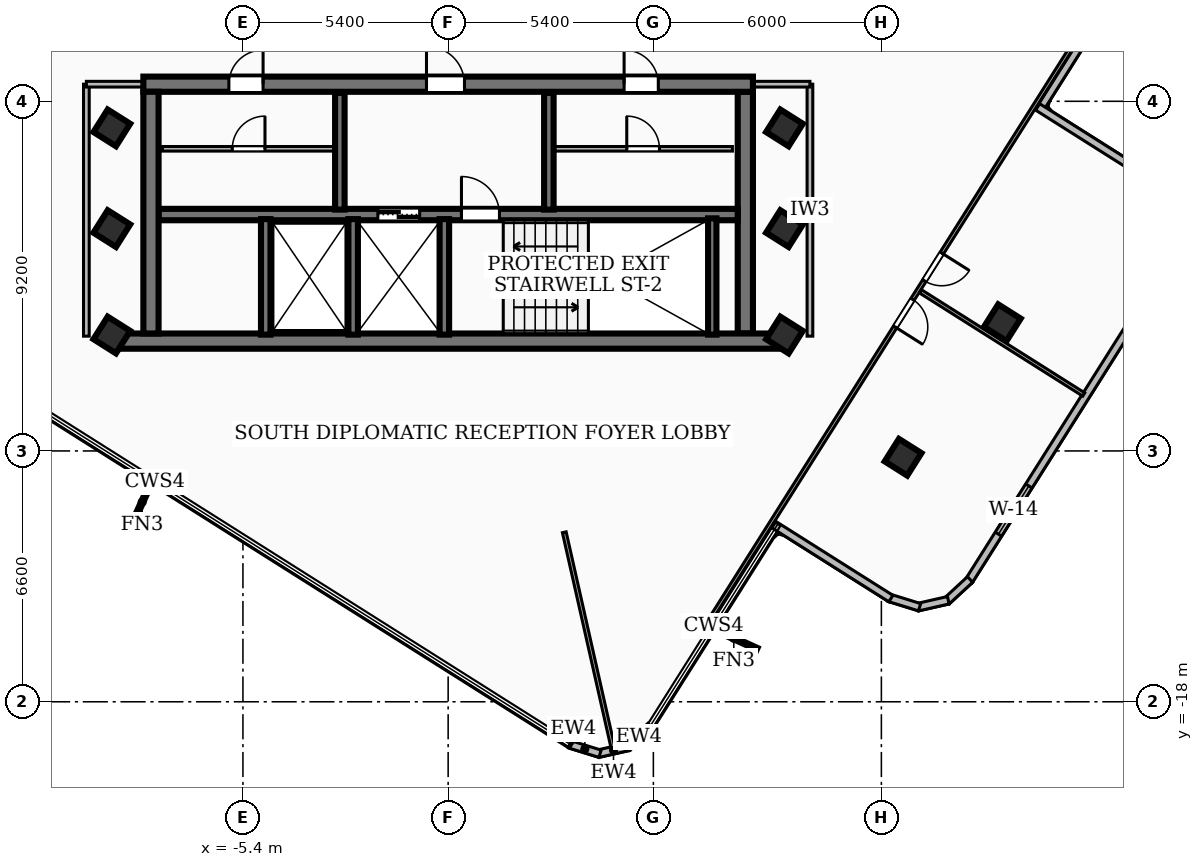
"""IFC4 building model, lengths in metres.
Left out: names, types, materials, properties, quantities, classifications, styles, units other than length and angle.
Written with IfcOpenShell. Run it as: python <this file> out.ifc"""

import sys

from ifc_helpers import new_model, si_unit, direction, frame, frame_2d, origin, origin_2d, place, context, subcontext, project, spatial, rectangle, extrude, element, fill, save


model = new_model("IFC4")
c1 = context("Model", 3, precision=1e-05, world=origin(), true_north=direction((0.0, 1.0)))
c2 = subcontext(c1, "Body", "Model", "MODEL_VIEW")
j1 = project(units=[si_unit("LENGTHUNIT", "METRE"), si_unit("PLANEANGLEUNIT", "RADIAN")], contexts=[c1])
p1 = place(None, origin())
s1 = spatial("IfcSite", under=j1, at=p1, CompositionType="ELEMENT")
p2 = place(p1, origin())
s2 = spatial("IfcBuilding", under=s1, at=p2, CompositionType="ELEMENT")
p3 = place(p2, frame((0.0, 0.0, 271.44)))
s3 = spatial("IfcBuildingStorey", under=s2, at=p3, CompositionType="ELEMENT", Elevation=271.44)
p4 = place(p3, frame((8.78, -8.51, 0.0), z_axis=(0.0, 0.0, 1.0), x_axis=(-1.0, 0.0, 0.0)))
e1 = element("IfcWall", 1, at=p4, inside=s3, PredefinedType="SHEAR", context=c2, shape_type="SweptSolid", body=[
    extrude(rectangle(XDim=17.56, YDim=0.4, at=frame_2d((8.78, 0.0))), origin(), (0.0, 0.0, 1.0), 3.16),
])
p5 = place(p3, frame((-8.02, -1.75, 0.0), z_axis=(0.0, 0.0, 1.0), x_axis=(1.0, 0.0, 0.0)))
e2 = element("IfcWall", 2, at=p5, inside=s3, PredefinedType="SHEAR", context=c2, shape_type="SweptSolid", body=[
    extrude(rectangle(XDim=16.04, YDim=0.4, at=frame_2d((8.02, 0.0))), origin(), (0.0, 0.0, 1.0), 3.16),
])
p6 = place(p5, frame((7.45, 0.0, 0.0)))
e3 = element("IfcOpeningElement", 3, at=p6, cuts=e2, PredefinedType="OPENING", context=c2, shape_type="SweptSolid", body=[
    extrude(rectangle(XDim=1.0, YDim=2.1, at=frame_2d((0.5, 1.05))), frame((0.0, 0.21, 0.0), z_axis=(0.0, -1.0, 0.0), x_axis=(1.0, 0.0, 0.0)), (0.0, 0.0, 1.0), 0.42),
])
p7 = place(p5, frame((12.65, 0.0, 0.0)))
e4 = element("IfcOpeningElement", 4, at=p7, cuts=e2, PredefinedType="OPENING", context=c2, shape_type="SweptSolid", body=[
    extrude(rectangle(XDim=0.9, YDim=2.06, at=frame_2d((0.45, 1.03))), frame((0.0, 0.21, 0.0), z_axis=(0.0, -1.0, 0.0), x_axis=(1.0, 0.0, 0.0)), (0.0, 0.0, 1.0), 0.42),
])
p8 = place(p5, frame((2.25, 0.0, 0.0)))
e5 = element("IfcOpeningElement", 5, at=p8, cuts=e2, PredefinedType="OPENING", context=c2, shape_type="SweptSolid", body=[
    extrude(rectangle(XDim=0.9, YDim=2.06, at=frame_2d((0.45, 1.03))), frame((0.0, 0.21, 0.0), z_axis=(0.0, -1.0, 0.0), x_axis=(1.0, 0.0, 0.0)), (0.0, 0.0, 1.0), 0.42),
])
for number, where, z_axis, x_axis in (
    (6, (-7.82, -8.31, 0.0), (0.0, 0.0, 1.0), (0.0, 1.0, 0.0)),
    (7, (7.82, -1.95, 0.0), (0.0, 0.0, 1.0), (0.0, -1.0, 0.0)),
):
    element("IfcWall", number, at=place(p3, frame(where, z_axis=z_axis, x_axis=x_axis)), inside=s3, PredefinedType="SHEAR", context=c2, shape_type="SweptSolid", body=[
        extrude(rectangle(XDim=6.36, YDim=0.4, at=frame_2d((3.18, 0.0))), origin(), (0.0, 0.0, 1.0), 3.16),
    ])
p9 = place(p3, frame((-7.62, -5.18, 0.0), z_axis=(0.0, 0.0, 1.0), x_axis=(1.0, 0.0, 0.0)))
e8 = element("IfcWall", 8, at=p9, inside=s3, PredefinedType="SOLIDWALL", context=c2, shape_type="SweptSolid", body=[
    extrude(rectangle(XDim=15.24, YDim=0.3, at=frame_2d((7.62, 0.0))), origin(), (0.0, 0.0, 1.0), 3.16),
])
p10 = place(p9, frame((5.77, 0.0, 0.0)))
e9 = element("IfcOpeningElement", 9, at=p10, cuts=e8, PredefinedType="OPENING", context=c2, shape_type="SweptSolid", body=[
    extrude(rectangle(XDim=1.1, YDim=2.15, at=frame_2d((0.55, 1.075))), frame((0.0, 0.16, 0.0), z_axis=(0.0, -1.0, 0.0), x_axis=(1.0, 0.0, 0.0)), (0.0, 0.0, 1.0), 0.32),
])
p11 = place(p9, frame((7.97, 0.0, 0.0)))
e10 = element("IfcOpeningElement", 10, at=p11, cuts=e8, PredefinedType="OPENING", context=c2, shape_type="SweptSolid", body=[
    extrude(rectangle(XDim=1.0, YDim=2.1, at=frame_2d((0.5, 1.05))), frame((0.0, 0.16, 0.0), z_axis=(0.0, -1.0, 0.0), x_axis=(1.0, 0.0, 0.0)), (0.0, 0.0, 1.0), 0.32),
])
p12 = place(p3, frame((6.95, -8.34, 0.0), z_axis=(0.0, 0.0, 1.0), x_axis=(0.0, 1.0, 0.0)))
e11 = element("IfcWall", 11, at=p12, inside=s3, PredefinedType="SOLIDWALL", context=c2, shape_type="SweptSolid", body=[
    extrude(rectangle(XDim=3.06, YDim=0.22, at=frame_2d((1.53, 0.0))), origin(), (0.0, 0.0, 1.0), 3.16),
])
for number, where, z_axis, x_axis in (
    (12, (-0.1, -8.34, 0.0), (0.0, 0.0, 1.0), (0.0, 1.0, 0.0)),
    (13, (-2.5, -8.34, 0.0), (0.0, 0.0, 1.0), (0.0, 1.0, 0.0)),
    (14, (-4.8, -8.34, 0.0), (0.0, 0.0, 1.0), (0.0, 1.0, 0.0)),
):
    element("IfcWall", number, at=place(p3, frame(where, z_axis=z_axis, x_axis=x_axis)), inside=s3, PredefinedType="SOLIDWALL", context=c2, shape_type="SweptSolid", body=[
        extrude(rectangle(XDim=3.04, YDim=0.25, at=frame_2d((1.52, 0.0))), origin(), (0.0, 0.0, 1.0), 3.16),
    ])
for number, where, z_axis, x_axis in (
    (15, (-2.85, -5.05, 0.0), (0.0, 0.0, 1.0), (0.0, 1.0, 0.0)),
    (16, (2.65, -5.05, 0.0), (0.0, 0.0, 1.0), (0.0, 1.0, 0.0)),
):
    element("IfcWall", number, at=place(p3, frame(where, z_axis=z_axis, x_axis=x_axis)), inside=s3, PredefinedType="SOLIDWALL", context=c2, shape_type="SweptSolid", body=[
        extrude(rectangle(XDim=3.07, YDim=0.25, at=frame_2d((1.535, 0.0))), origin(), (0.0, 0.0, 1.0), 3.16),
    ])
for number, where, z_axis, x_axis in (
    (17, (-8.85, -5.55, 0.0), (0.0, 0.0, 1.0), (0.534, 0.845, 0.0)),
    (18, (-8.85, -2.9, 0.0), (0.0, 0.0, 1.0), (0.534, 0.845, 0.0)),
    (19, (8.85, -5.55, 0.0), (0.0, 0.0, 1.0), (0.534, 0.845, 0.0)),
    (20, (8.85, -2.9, 0.0), (0.0, 0.0, 1.0), (0.534, 0.845, 0.0)),
    (21, (8.85, -8.35, 0.0), (0.0, 0.0, 1.0), (0.534, 0.845, 0.0)),
    (22, (-8.85, -8.35, 0.0), (0.0, 0.0, 1.0), (0.534, 0.845, 0.0)),
    (23, (11.971, -11.566, 0.0), (0.0, 0.0, 1.0), (0.534, 0.845, 0.0)),
    (24, (14.583, -8.026, 0.0), (0.0, 0.0, 1.0), (0.534, 0.845, 0.0)),
):
    element("IfcColumn", number, at=place(p3, frame(where, z_axis=z_axis, x_axis=x_axis)), inside=s3, PredefinedType="COLUMN", context=c2, shape_type="SweptSolid", body=[
        extrude(rectangle(XDim=0.7, YDim=0.7, at=origin_2d()), origin(), (0.0, 0.0, 1.0), 3.42),
    ])
p13 = place(p3, frame((5.326, -18.638, 0.0), z_axis=(0.0, 0.0, 1.0), x_axis=(-0.734546260064, -0.678558613405, 0.0)))
e25 = element("IfcWall", 25, at=p13, inside=s3, PredefinedType="SOLIDWALL", context=c2, shape_type="SweptSolid", body=[
    extrude(rectangle(XDim=0.837, YDim=0.2, at=frame_2d((0.418, 0.0))), origin(), (0.0, 0.0, 1.0), 3.16),
])
p14 = place(p3, frame((4.753, -19.183, 0.0), z_axis=(0.0, 0.0, 1.0), x_axis=(-0.975095027757, -0.22178748126, 0.0)))
e26 = element("IfcWall", 26, at=p14, inside=s3, PredefinedType="SOLIDWALL", context=c2, shape_type="SweptSolid", body=[
    extrude(rectangle(XDim=0.824, YDim=0.2, at=frame_2d((0.412, 0.0))), origin(), (0.0, 0.0, 1.0), 3.16),
])
p15 = place(p3, frame((3.997, -19.367, 0.0), z_axis=(0.0, 0.0, 1.0), x_axis=(-0.955248680357, 0.295803919306, 0.0)))
e27 = element("IfcWall", 27, at=p15, inside=s3, PredefinedType="SOLIDWALL", context=c2, shape_type="SweptSolid", body=[
    extrude(rectangle(XDim=0.839, YDim=0.2, at=frame_2d((0.419, 0.0))), origin(), (0.0, 0.0, 1.0), 3.16),
])
p16 = place(p3, frame((19.139, 3.241, 0.0), z_axis=(0.0, 0.0, 1.0), x_axis=(-0.534084270085, -0.845431246435, 0.0)))
e28 = element("IfcWall", 28, at=p16, inside=s3, PredefinedType="SOLIDWALL", context=c2, shape_type="SweptSolid", body=[
    extrude(rectangle(XDim=6.742, YDim=0.2, at=frame_2d((3.371, 0.0))), origin(), (0.0, 0.0, 1.0), 3.16),
])
p17 = place(p3, frame((15.513, -2.348, 0.0), z_axis=(0.0, 0.0, 1.0), x_axis=(0.8454427056, -0.534066130313, 0.0)))
e29 = element("IfcWall", 29, at=p17, inside=s3, PredefinedType="SOLIDWALL", context=c2, shape_type="SweptSolid", body=[
    extrude(rectangle(XDim=3.642, YDim=0.2, at=frame_2d((1.821, 0.0))), origin(), (0.0, 0.0, 1.0), 3.16),
])
p18 = place(p3, frame((19.056, -6.346, 0.0), z_axis=(0.0, 0.0, 1.0), x_axis=(-0.534060804588, -0.845446069837, 0.0)))
e30 = element("IfcWall", 30, at=p18, inside=s3, PredefinedType="SOLIDWALL", context=c2, shape_type="SweptSolid", body=[
    extrude(rectangle(XDim=10.023, YDim=0.2, at=frame_2d((5.012, 0.0))), origin(), (0.0, 0.0, 1.0), 3.16),
])
p19 = place(p18, frame((7.068, 0.0, 0.85)))
e31 = element("IfcOpeningElement", 31, at=p19, cuts=e30, PredefinedType="OPENING", context=c2, shape_type="SweptSolid", body=[
    extrude(rectangle(XDim=1.5, YDim=1.5, at=frame_2d((0.75, 0.75))), frame((0.0, 0.11, 0.0), z_axis=(0.0, -1.0, 0.0), x_axis=(1.0, 0.0, 0.0)), (0.0, 0.0, 1.0), 0.22),
])
p20 = place(p3, frame((13.734, -14.782, 0.0), z_axis=(0.0, 0.0, 1.0), x_axis=(-0.73396507435, -0.679187212508, 0.0)))
e32 = element("IfcWall", 32, at=p20, inside=s3, PredefinedType="SOLIDWALL", context=c2, shape_type="SweptSolid", body=[
    extrude(rectangle(XDim=0.838, YDim=0.2, at=frame_2d((0.419, 0.0))), origin(), (0.0, 0.0, 1.0), 3.16),
])
p21 = place(p3, frame((13.161, -15.328, 0.0), z_axis=(0.0, 0.0, 1.0), x_axis=(-0.975030953114, -0.222068999343, 0.0)))
e33 = element("IfcWall", 33, at=p21, inside=s3, PredefinedType="SOLIDWALL", context=c2, shape_type="SweptSolid", body=[
    extrude(rectangle(XDim=0.824, YDim=0.2, at=frame_2d((0.412, 0.0))), origin(), (0.0, 0.0, 1.0), 3.16),
])
p22 = place(p3, frame((12.405, -15.512, 0.0), z_axis=(0.0, 0.0, 1.0), x_axis=(-0.95514660916, 0.296133339917, 0.0)))
e34 = element("IfcWall", 34, at=p22, inside=s3, PredefinedType="SOLIDWALL", context=c2, shape_type="SweptSolid", body=[
    extrude(rectangle(XDim=0.838, YDim=0.2, at=frame_2d((0.419, 0.0))), origin(), (0.0, 0.0, 1.0), 3.16),
])
p23 = place(p3, frame((11.65, -15.284, 0.0), z_axis=(0.0, 0.0, 1.0), x_axis=(-0.84553031048, 0.533927423962, 0.0)))
e35 = element("IfcWall", 35, at=p23, inside=s3, PredefinedType="SOLIDWALL", context=c2, shape_type="SweptSolid", body=[
    extrude(rectangle(XDim=3.643, YDim=0.2, at=frame_2d((1.821, 0.0))), origin(), (0.0, 0.0, 1.0), 3.16),
])
p24 = place(p3, frame((2.8, -3.45, 0.0), z_axis=(0.0, 0.0, 1.0), x_axis=(1.0, 0.0, 0.0)))
e36 = element("IfcWall", 36, at=p24, inside=s3, PredefinedType="PARTITIONING", context=c2, shape_type="SweptSolid", body=[
    extrude(rectangle(XDim=4.68, YDim=0.12, at=frame_2d((2.34, 0.0))), origin(), (0.0, 0.0, 1.0), 3.16),
])
p25 = place(p24, frame((1.9, 0.0, 0.0)))
e37 = element("IfcOpeningElement", 37, at=p25, cuts=e36, PredefinedType="OPENING", context=c2, shape_type="SweptSolid", body=[
    extrude(rectangle(XDim=0.86, YDim=2.04, at=frame_2d((0.43, 1.02))), frame((0.0, 0.07, 0.0), z_axis=(0.0, -1.0, 0.0), x_axis=(1.0, 0.0, 0.0)), (0.0, 0.0, 1.0), 0.14),
])
p26 = place(p3, frame((-7.52, -3.45, 0.0), z_axis=(0.0, 0.0, 1.0), x_axis=(1.0, 0.0, 0.0)))
e38 = element("IfcWall", 38, at=p26, inside=s3, PredefinedType="PARTITIONING", context=c2, shape_type="SweptSolid", body=[
    extrude(rectangle(XDim=4.54, YDim=0.12, at=frame_2d((2.27, 0.0))), origin(), (0.0, 0.0, 1.0), 3.16),
])
p27 = place(p26, frame((1.84, 0.0, 0.0)))
e39 = element("IfcOpeningElement", 39, at=p27, cuts=e38, PredefinedType="OPENING", context=c2, shape_type="SweptSolid", body=[
    extrude(rectangle(XDim=0.86, YDim=2.04, at=frame_2d((0.43, 1.02))), frame((0.0, 0.07, 0.0), z_axis=(0.0, -1.0, 0.0), x_axis=(1.0, 0.0, 0.0)), (0.0, 0.0, 1.0), 0.14),
])
p28 = place(p3, frame((-9.52, -8.38, 0.0), z_axis=(0.0, 0.0, 1.0), x_axis=(0.0, 1.0, 0.0)))
e40 = element("IfcWall", 40, at=p28, inside=s3, PredefinedType="PARTITIONING", context=c2, shape_type="SweptSolid", body=[
    extrude(rectangle(XDim=6.63, YDim=0.15, at=frame_2d((3.315, 0.0))), origin(), (0.0, 0.0, 1.0), 3.16),
])
p29 = place(p3, frame((-7.85, -1.75, 0.0), z_axis=(0.0, 0.0, 1.0), x_axis=(-1.0, 0.0, 0.0)))
e41 = element("IfcWall", 41, at=p29, inside=s3, PredefinedType="PARTITIONING", context=c2, shape_type="SweptSolid", body=[
    extrude(rectangle(XDim=1.67, YDim=0.15, at=frame_2d((0.835, 0.0))), origin(), (0.0, 0.0, 1.0), 2.39),
])
p30 = place(p3, frame((9.52, -8.38, 0.0), z_axis=(0.0, 0.0, 1.0), x_axis=(0.0, 1.0, 0.0)))
e42 = element("IfcWall", 42, at=p30, inside=s3, PredefinedType="PARTITIONING", context=c2, shape_type="SweptSolid", body=[
    extrude(rectangle(XDim=6.63, YDim=0.15, at=frame_2d((3.315, 0.0))), origin(), (0.0, 0.0, 1.0), 2.53),
])
p31 = place(p3, frame((7.85, -1.75, 0.0), z_axis=(0.0, 0.0, 1.0), x_axis=(1.0, 0.0, 0.0)))
e43 = element("IfcWall", 43, at=p31, inside=s3, PredefinedType="PARTITIONING", context=c2, shape_type="SweptSolid", body=[
    extrude(rectangle(XDim=1.67, YDim=0.15, at=frame_2d((0.835, 0.0))), origin(), (0.0, 0.0, 1.0), 2.39),
])
p32 = place(p3, frame((3.056, -13.54, 0.0), z_axis=(0.0, 0.0, 1.0), x_axis=(0.22033949405, -0.975423245244, 0.0)))
e44 = element("IfcWall", 44, at=p32, inside=s3, PredefinedType="PARTITIONING", context=c2, shape_type="SweptSolid", body=[
    extrude(rectangle(XDim=5.814, YDim=0.1, at=frame_2d((2.907, 0.0))), origin(), (0.0, 0.0, 1.0), 3.16),
])
p33 = place(p3, frame((-17.646, -1.178, 0.0), z_axis=(0.0, 0.0, 1.0), x_axis=(0.534052309352, 0.845451436143, 0.0)))
e45 = element("IfcWall", 45, at=p33, inside=s3, PredefinedType="PARTITIONING", context=c2, shape_type="SweptSolid", body=[
    extrude(rectangle(XDim=20.44, YDim=0.1, at=frame_2d((10.22, 0.0))), origin(), (0.0, 0.0, 1.0), 2.53),
])
p34 = place(p33, frame((11.259, 0.0, 0.0)))
e46 = element("IfcOpeningElement", 46, at=p34, cuts=e45, PredefinedType="OPENING", context=c2, shape_type="SweptSolid", body=[
    extrude(rectangle(XDim=0.86, YDim=2.04, at=frame_2d((0.43, 1.02))), frame((0.0, 0.06, 0.0), z_axis=(0.0, -1.0, 0.0), x_axis=(1.0, 0.0, 0.0)), (0.0, 0.0, 1.0), 0.12),
])
p35 = place(p33, frame((9.819, 0.0, 0.0)))
e47 = element("IfcOpeningElement", 47, at=p35, cuts=e45, PredefinedType="OPENING", context=c2, shape_type="SweptSolid", body=[
    extrude(rectangle(XDim=0.86, YDim=2.04, at=frame_2d((0.43, 1.02))), frame((0.0, 0.06, 0.0), z_axis=(0.0, -1.0, 0.0), x_axis=(1.0, 0.0, 0.0)), (0.0, 0.0, 1.0), 0.12),
])
p36 = place(p3, frame((12.426, -7.199, 0.0), z_axis=(0.0, 0.0, 1.0), x_axis=(0.845412458252, -0.53411400977, 0.0)))
e48 = element("IfcWall", 48, at=p36, inside=s3, PredefinedType="PARTITIONING", context=c2, shape_type="SweptSolid", body=[
    extrude(rectangle(XDim=5.085, YDim=0.1, at=frame_2d((2.542, 0.0))), origin(), (0.0, 0.0, 1.0), 2.53),
])
p37 = place(p3, frame((17.646, 1.178, 0.0), z_axis=(0.0, 0.0, 1.0), x_axis=(-0.534052309352, -0.845451436143, 0.0)))
e49 = element("IfcWall", 49, at=p37, inside=s3, PredefinedType="PARTITIONING", context=c2, shape_type="SweptSolid", body=[
    extrude(rectangle(XDim=20.44, YDim=0.1, at=frame_2d((10.22, 0.0))), origin(), (0.0, 0.0, 1.0), 2.53),
])
p38 = place(p37, frame((10.159, 0.0, 0.0)))
e50 = element("IfcOpeningElement", 50, at=p38, cuts=e49, PredefinedType="OPENING", context=c2, shape_type="SweptSolid", body=[
    extrude(rectangle(XDim=0.86, YDim=2.04, at=frame_2d((0.43, 1.02))), frame((0.0, 0.06, 0.0), z_axis=(0.0, -1.0, 0.0), x_axis=(1.0, 0.0, 0.0)), (0.0, 0.0, 1.0), 0.12),
])
p39 = place(p37, frame((8.719, 0.0, 0.0)))
e51 = element("IfcOpeningElement", 51, at=p39, cuts=e49, PredefinedType="OPENING", context=c2, shape_type="SweptSolid", body=[
    extrude(rectangle(XDim=0.86, YDim=2.04, at=frame_2d((0.43, 1.02))), frame((0.0, 0.06, 0.0), z_axis=(0.0, -1.0, 0.0), x_axis=(1.0, 0.0, 0.0)), (0.0, 0.0, 1.0), 0.12),
])
p40 = place(p19, origin())
e52 = element("IfcWindow", 52, at=p40, inside=s3, PartitioningType="SINGLE_PANEL", PredefinedType="WINDOW", context=c2, shape_type="SweptSolid", body=[
    extrude(rectangle(XDim=1.5, YDim=1.5, at=frame_2d((0.75, 0.75))), frame((0.0, 0.03, 0.0), z_axis=(0.0, -1.0, 0.0), x_axis=(1.0, 0.0, 0.0)), (0.0, 0.0, 1.0), 0.06),
])
fill(e31, e52)
p41 = place(p6, origin())
e53 = element("IfcDoor", 53, at=p41, inside=s3, OperationType="SINGLE_SWING_LEFT", PredefinedType="DOOR", context=c2, shape_type="SweptSolid", body=[
    extrude(rectangle(XDim=1.0, YDim=2.1, at=frame_2d((0.5, 1.05))), frame((0.0, 0.025, 0.0), z_axis=(0.0, -1.0, 0.0), x_axis=(1.0, 0.0, 0.0)), (0.0, 0.0, 1.0), 0.05),
])
fill(e3, e53)
p42 = place(p10, origin())
e54 = element("IfcDoor", 54, at=p42, inside=s3, OperationType="DOUBLE_DOOR_SLIDING", PredefinedType="DOOR", context=c2, shape_type="SweptSolid", body=[
    extrude(rectangle(XDim=1.1, YDim=2.15, at=frame_2d((0.55, 1.075))), frame((0.0, 0.025, 0.0), z_axis=(0.0, -1.0, 0.0), x_axis=(1.0, 0.0, 0.0)), (0.0, 0.0, 1.0), 0.05),
])
fill(e9, e54)
p43 = place(p11, origin())
e55 = element("IfcDoor", 55, at=p43, inside=s3, OperationType="SINGLE_SWING_LEFT", PredefinedType="DOOR", context=c2, shape_type="SweptSolid", body=[
    extrude(rectangle(XDim=1.0, YDim=2.1, at=frame_2d((0.5, 1.05))), frame((0.0, 0.025, 0.0), z_axis=(0.0, -1.0, 0.0), x_axis=(1.0, 0.0, 0.0)), (0.0, 0.0, 1.0), 0.05),
])
fill(e10, e55)
p44 = place(p7, origin())
e56 = element("IfcDoor", 56, at=p44, inside=s3, OperationType="SINGLE_SWING_LEFT", PredefinedType="DOOR", context=c2, shape_type="SweptSolid", body=[
    extrude(rectangle(XDim=0.9, YDim=2.06, at=frame_2d((0.45, 1.03))), frame((0.0, 0.025, 0.0), z_axis=(0.0, -1.0, 0.0), x_axis=(1.0, 0.0, 0.0)), (0.0, 0.0, 1.0), 0.05),
])
fill(e4, e56)
p45 = place(p8, origin())
e57 = element("IfcDoor", 57, at=p45, inside=s3, OperationType="SINGLE_SWING_RIGHT", PredefinedType="DOOR", context=c2, shape_type="SweptSolid", body=[
    extrude(rectangle(XDim=0.9, YDim=2.06, at=frame_2d((0.45, 1.03))), frame((0.0, 0.025, 0.0), z_axis=(0.0, -1.0, 0.0), x_axis=(1.0, 0.0, 0.0)), (0.0, 0.0, 1.0), 0.05),
])
fill(e5, e57)
p46 = place(p25, origin())
e58 = element("IfcDoor", 58, at=p46, inside=s3, OperationType="SINGLE_SWING_LEFT", PredefinedType="DOOR", context=c2, shape_type="SweptSolid", body=[
    extrude(rectangle(XDim=0.86, YDim=2.04, at=frame_2d((0.43, 1.02))), frame((0.0, 0.025, 0.0), z_axis=(0.0, -1.0, 0.0), x_axis=(1.0, 0.0, 0.0)), (0.0, 0.0, 1.0), 0.05),
])
fill(e37, e58)
p47 = place(p27, origin())
e59 = element("IfcDoor", 59, at=p47, inside=s3, OperationType="SINGLE_SWING_RIGHT", PredefinedType="DOOR", context=c2, shape_type="SweptSolid", body=[
    extrude(rectangle(XDim=0.86, YDim=2.04, at=frame_2d((0.43, 1.02))), frame((0.0, 0.025, 0.0), z_axis=(0.0, -1.0, 0.0), x_axis=(1.0, 0.0, 0.0)), (0.0, 0.0, 1.0), 0.05),
])
fill(e39, e59)
p48 = place(p38, origin())
e60 = element("IfcDoor", 60, at=p48, inside=s3, OperationType="SINGLE_SWING_RIGHT", PredefinedType="DOOR", context=c2, shape_type="SweptSolid", body=[
    extrude(rectangle(XDim=0.86, YDim=2.04, at=frame_2d((0.43, 1.02))), frame((0.0, 0.025, 0.0), z_axis=(0.0, -1.0, 0.0), x_axis=(1.0, 0.0, 0.0)), (0.0, 0.0, 1.0), 0.05),
])
fill(e50, e60)
p49 = place(p39, origin())
e61 = element("IfcDoor", 61, at=p49, inside=s3, OperationType="SINGLE_SWING_LEFT", PredefinedType="DOOR", context=c2, shape_type="SweptSolid", body=[
    extrude(rectangle(XDim=0.86, YDim=2.04, at=frame_2d((0.43, 1.02))), frame((0.0, 0.025, 0.0), z_axis=(0.0, -1.0, 0.0), x_axis=(1.0, 0.0, 0.0)), (0.0, 0.0, 1.0), 0.05),
])
fill(e51, e61)
save(model, sys.argv[1])
